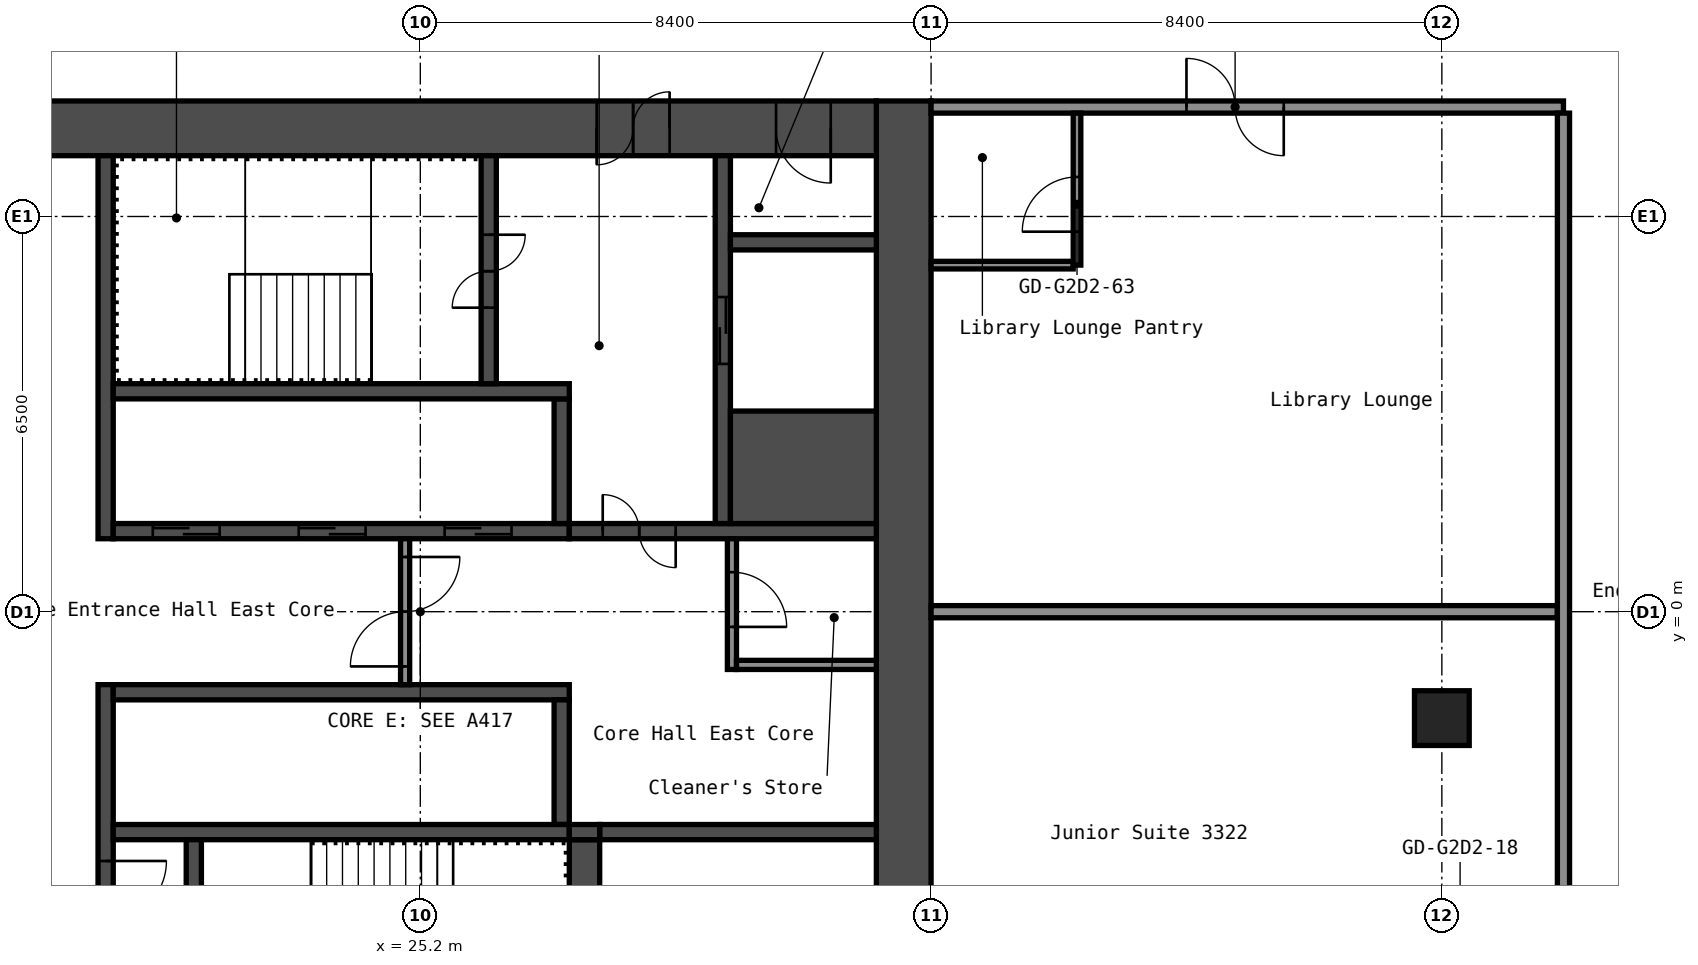
"""IFC4 building model, lengths in metres.
Left out: names, types, materials, properties, quantities, classifications, styles, units other than length and angle.
Written with IfcOpenShell. Run it as: python <this file> out.ifc"""

import sys

from ifc_helpers import new_model, si_unit, direction, frame, frame_2d, origin, origin_2d, place, context, subcontext, project, spatial, rectangle, hollow_rectangle, extrude, element, fill, save


model = new_model("IFC4")
c1 = context("Model", 3, precision=1e-05, world=origin(), true_north=direction((0.0, 1.0)))
c2 = subcontext(c1, "Body", "Model", "MODEL_VIEW")
j1 = project(units=[si_unit("LENGTHUNIT", "METRE"), si_unit("PLANEANGLEUNIT", "RADIAN")], contexts=[c1])
p1 = place(None, origin())
s1 = spatial("IfcSite", under=j1, at=p1, CompositionType="ELEMENT")
p2 = place(p1, origin())
s2 = spatial("IfcBuilding", under=s1, at=p2, CompositionType="ELEMENT")
p3 = place(p2, frame((0.0, 0.0, 117.0)))
s3 = spatial("IfcBuildingStorey", under=s2, at=p3, CompositionType="ELEMENT", Elevation=117.0)
p4 = place(p3, frame((42.0, -1.75, 0.0), z_axis=(0.0, 0.0, 1.0), x_axis=(1.0, 0.0, 0.0)))
e1 = element("IfcColumn", 1, at=p4, inside=s3, PredefinedType="COLUMN", context=c2, shape_type="SweptSolid", body=[
    extrude(hollow_rectangle(XDim=0.9, YDim=0.9, WallThickness=0.036, at=origin_2d()), origin(), (0.0, 0.0, 1.0), 2.9),
])
p5 = place(p3, frame((33.15, -8.4, 0.0), z_axis=(0.0, 0.0, 1.0), x_axis=(0.0, 1.0, 0.0)))
e2 = element("IfcWall", 2, at=p5, inside=s3, PredefinedType="SHEAR", context=c2, shape_type="SweptSolid", body=[
    extrude(rectangle(XDim=16.8, YDim=0.9, at=frame_2d((8.4, 0.0))), origin(), (0.0, 0.0, 1.0), 2.9),
])
p6 = place(p3, frame((17.7, 7.95, 0.0), z_axis=(0.0, 0.0, 1.0), x_axis=(1.0, 0.0, 0.0)))
e3 = element("IfcWall", 3, at=p6, inside=s3, PredefinedType="SHEAR", context=c2, shape_type="SweptSolid", body=[
    extrude(rectangle(XDim=15.0, YDim=0.9, at=frame_2d((7.5, 0.0))), origin(), (0.0, 0.0, 1.0), 2.9),
])
p7 = place(p6, frame((10.4, 0.0, 0.0)))
e4 = element("IfcOpeningElement", 4, at=p7, cuts=e3, PredefinedType="OPENING", context=c2, shape_type="SweptSolid", body=[
    extrude(rectangle(XDim=1.2, YDim=2.1, at=frame_2d((0.6, 1.05))), frame((0.0, 0.46, 0.0), z_axis=(0.0, -1.0, 0.0), x_axis=(1.0, 0.0, 0.0)), (0.0, 0.0, 1.0), 0.92),
])
p8 = place(p6, frame((13.35, 0.0, 0.0)))
e5 = element("IfcOpeningElement", 5, at=p8, cuts=e3, PredefinedType="OPENING", context=c2, shape_type="SweptSolid", body=[
    extrude(rectangle(XDim=0.9, YDim=2.1, at=frame_2d((0.45, 1.05))), frame((0.0, 0.46, 0.0), z_axis=(0.0, -1.0, 0.0), x_axis=(1.0, 0.0, 0.0)), (0.0, 0.0, 1.0), 0.92),
])
p9 = place(p3, frame((20.025, 1.2, 0.0), z_axis=(0.0, 0.0, 1.0), x_axis=(0.0, 1.0, 0.0)))
e6 = element("IfcWall", 6, at=p9, inside=s3, PredefinedType="SHEAR", context=c2, shape_type="SweptSolid", body=[
    extrude(rectangle(XDim=6.3, YDim=0.25, at=frame_2d((3.15, 0.0))), origin(), (0.0, 0.0, 1.0), 2.9),
])
p10 = place(p3, frame((20.025, -7.5, 0.0), z_axis=(0.0, 0.0, 1.0), x_axis=(0.0, 1.0, 0.0)))
e7 = element("IfcWall", 7, at=p10, inside=s3, PredefinedType="SHEAR", context=c2, shape_type="SweptSolid", body=[
    extrude(rectangle(XDim=6.3, YDim=0.25, at=frame_2d((3.15, 0.0))), origin(), (0.0, 0.0, 1.0), 2.9),
])
p11 = place(p10, frame((2.4, 0.0, 0.0)))
e8 = element("IfcOpeningElement", 8, at=p11, cuts=e7, PredefinedType="OPENING", context=c2, shape_type="SweptSolid", body=[
    extrude(rectangle(XDim=1.0, YDim=2.1, at=frame_2d((0.5, 1.05))), frame((0.0, 0.135, 0.0), z_axis=(0.0, -1.0, 0.0), x_axis=(1.0, 0.0, 0.0)), (0.0, 0.0, 1.0), 0.27),
])
p12 = place(p3, frame((20.15, 1.325, 0.0), z_axis=(0.0, 0.0, 1.0), x_axis=(1.0, 0.0, 0.0)))
e9 = element("IfcWall", 9, at=p12, inside=s3, PredefinedType="SHEAR", context=c2, shape_type="SweptSolid", body=[
    extrude(rectangle(XDim=7.5, YDim=0.25, at=frame_2d((3.75, 0.0))), origin(), (0.0, 0.0, 1.0), 2.9),
])
p13 = place(p12, frame((0.65, 0.0, 0.0)))
e10 = element("IfcOpeningElement", 10, at=p13, cuts=e9, PredefinedType="OPENING", context=c2, shape_type="SweptSolid", body=[
    extrude(rectangle(XDim=1.1, YDim=2.1, at=frame_2d((0.55, 1.05))), frame((0.0, 0.135, 0.0), z_axis=(0.0, -1.0, 0.0), x_axis=(1.0, 0.0, 0.0)), (0.0, 0.0, 1.0), 0.27),
])
p14 = place(p12, frame((3.05, 0.0, 0.0)))
e11 = element("IfcOpeningElement", 11, at=p14, cuts=e9, PredefinedType="OPENING", context=c2, shape_type="SweptSolid", body=[
    extrude(rectangle(XDim=1.1, YDim=2.1, at=frame_2d((0.55, 1.05))), frame((0.0, 0.135, 0.0), z_axis=(0.0, -1.0, 0.0), x_axis=(1.0, 0.0, 0.0)), (0.0, 0.0, 1.0), 0.27),
])
p15 = place(p12, frame((5.45, 0.0, 0.0)))
e12 = element("IfcOpeningElement", 12, at=p15, cuts=e9, PredefinedType="OPENING", context=c2, shape_type="SweptSolid", body=[
    extrude(rectangle(XDim=1.1, YDim=2.1, at=frame_2d((0.55, 1.05))), frame((0.0, 0.135, 0.0), z_axis=(0.0, -1.0, 0.0), x_axis=(1.0, 0.0, 0.0)), (0.0, 0.0, 1.0), 0.27),
])
p16 = place(p3, frame((27.525, 1.45, 0.0), z_axis=(0.0, 0.0, 1.0), x_axis=(0.0, 1.0, 0.0)))
e13 = element("IfcWall", 13, at=p16, inside=s3, PredefinedType="SHEAR", context=c2, shape_type="SweptSolid", body=[
    extrude(rectangle(XDim=2.05, YDim=0.25, at=frame_2d((1.025, 0.0))), origin(), (0.0, 0.0, 1.0), 2.9),
])
p17 = place(p3, frame((20.15, 3.625, 0.0), z_axis=(0.0, 0.0, 1.0), x_axis=(1.0, 0.0, 0.0)))
e14 = element("IfcWall", 14, at=p17, inside=s3, PredefinedType="SHEAR", context=c2, shape_type="SweptSolid", body=[
    extrude(rectangle(XDim=7.5, YDim=0.25, at=frame_2d((3.75, 0.0))), origin(), (0.0, 0.0, 1.0), 2.9),
])
p18 = place(p3, frame((26.325, 3.75, 0.0), z_axis=(0.0, 0.0, 1.0), x_axis=(0.0, 1.0, 0.0)))
e15 = element("IfcWall", 15, at=p18, inside=s3, PredefinedType="SHEAR", context=c2, shape_type="SweptSolid", body=[
    extrude(rectangle(XDim=3.75, YDim=0.25, at=frame_2d((1.875, 0.0))), origin(), (0.0, 0.0, 1.0), 2.9),
])
p19 = place(p18, frame((1.25, 0.0, 0.0)))
e16 = element("IfcOpeningElement", 16, at=p19, cuts=e15, PredefinedType="OPENING", context=c2, shape_type="SweptSolid", body=[
    extrude(rectangle(XDim=1.2, YDim=2.1, at=frame_2d((0.6, 1.05))), frame((0.0, 0.135, 0.0), z_axis=(0.0, -1.0, 0.0), x_axis=(1.0, 0.0, 0.0)), (0.0, 0.0, 1.0), 0.27),
])
p20 = place(p3, frame((27.65, 1.325, 0.0), z_axis=(0.0, 0.0, 1.0), x_axis=(1.0, 0.0, 0.0)))
e17 = element("IfcWall", 17, at=p20, inside=s3, PredefinedType="SHEAR", context=c2, shape_type="SweptSolid", body=[
    extrude(rectangle(XDim=5.05, YDim=0.25, at=frame_2d((2.525, 0.0))), origin(), (0.0, 0.0, 1.0), 2.9),
])
p21 = place(p20, frame((0.55, 0.0, 0.0)))
e18 = element("IfcOpeningElement", 18, at=p21, cuts=e17, PredefinedType="OPENING", context=c2, shape_type="SweptSolid", body=[
    extrude(rectangle(XDim=1.2, YDim=2.1, at=frame_2d((0.6, 1.05))), frame((0.0, 0.135, 0.0), z_axis=(0.0, -1.0, 0.0), x_axis=(1.0, 0.0, 0.0)), (0.0, 0.0, 1.0), 0.27),
])
p22 = place(p3, frame((30.175, 1.45, 0.0), z_axis=(0.0, 0.0, 1.0), x_axis=(0.0, 1.0, 0.0)))
e19 = element("IfcWall", 19, at=p22, inside=s3, PredefinedType="SHEAR", context=c2, shape_type="SweptSolid", body=[
    extrude(rectangle(XDim=6.05, YDim=0.25, at=frame_2d((3.025, 0.0))), origin(), (0.0, 0.0, 1.0), 2.9),
])
p23 = place(p22, frame((2.625, 0.0, 0.0)))
e20 = element("IfcOpeningElement", 20, at=p23, cuts=e19, PredefinedType="OPENING", context=c2, shape_type="SweptSolid", body=[
    extrude(rectangle(XDim=1.1, YDim=2.1, at=frame_2d((0.55, 1.05))), frame((0.0, 0.135, 0.0), z_axis=(0.0, -1.0, 0.0), x_axis=(1.0, 0.0, 0.0)), (0.0, 0.0, 1.0), 0.27),
])
p24 = place(p3, frame((30.3, 2.375, 0.0), z_axis=(0.0, 0.0, 1.0), x_axis=(1.0, 0.0, 0.0)))
e21 = element("IfcWall", 21, at=p24, inside=s3, PredefinedType="SHEAR", context=c2, shape_type="SweptSolid", body=[
    extrude(rectangle(XDim=2.4, YDim=1.85, at=frame_2d((1.2, 0.0))), origin(), (0.0, 0.0, 1.0), 2.9),
])
p25 = place(p3, frame((30.3, 6.075, 0.0), z_axis=(0.0, 0.0, 1.0), x_axis=(1.0, 0.0, 0.0)))
e22 = element("IfcWall", 22, at=p25, inside=s3, PredefinedType="SHEAR", context=c2, shape_type="SweptSolid", body=[
    extrude(rectangle(XDim=2.4, YDim=0.25, at=frame_2d((1.2, 0.0))), origin(), (0.0, 0.0, 1.0), 2.9),
])
p26 = place(p3, frame((20.15, -1.325, 0.0), z_axis=(0.0, 0.0, 1.0), x_axis=(1.0, 0.0, 0.0)))
e23 = element("IfcWall", 23, at=p26, inside=s3, PredefinedType="SHEAR", context=c2, shape_type="SweptSolid", body=[
    extrude(rectangle(XDim=7.5, YDim=0.25, at=frame_2d((3.75, 0.0))), origin(), (0.0, 0.0, 1.0), 2.9),
])
p27 = place(p3, frame((27.525, -3.5, 0.0), z_axis=(0.0, 0.0, 1.0), x_axis=(0.0, 1.0, 0.0)))
e24 = element("IfcWall", 24, at=p27, inside=s3, PredefinedType="SHEAR", context=c2, shape_type="SweptSolid", body=[
    extrude(rectangle(XDim=2.05, YDim=0.25, at=frame_2d((1.025, 0.0))), origin(), (0.0, 0.0, 1.0), 2.9),
])
p28 = place(p3, frame((20.15, -3.625, 0.0), z_axis=(0.0, 0.0, 1.0), x_axis=(1.0, 0.0, 0.0)))
e25 = element("IfcWall", 25, at=p28, inside=s3, PredefinedType="SHEAR", context=c2, shape_type="SweptSolid", body=[
    extrude(rectangle(XDim=7.5, YDim=0.25, at=frame_2d((3.75, 0.0))), origin(), (0.0, 0.0, 1.0), 2.9),
])
p29 = place(p3, frame((21.475, -7.5, 0.0), z_axis=(0.0, 0.0, 1.0), x_axis=(0.0, 1.0, 0.0)))
e26 = element("IfcWall", 26, at=p29, inside=s3, PredefinedType="SHEAR", context=c2, shape_type="SweptSolid", body=[
    extrude(rectangle(XDim=3.75, YDim=0.25, at=frame_2d((1.875, 0.0))), origin(), (0.0, 0.0, 1.0), 2.9),
])
p30 = place(p29, frame((1.3, 0.0, 0.0)))
e27 = element("IfcOpeningElement", 27, at=p30, cuts=e26, PredefinedType="OPENING", context=c2, shape_type="SweptSolid", body=[
    extrude(rectangle(XDim=1.2, YDim=2.1, at=frame_2d((0.6, 1.05))), frame((0.0, 0.135, 0.0), z_axis=(0.0, -1.0, 0.0), x_axis=(1.0, 0.0, 0.0)), (0.0, 0.0, 1.0), 0.27),
])
p31 = place(p3, frame((27.9, -7.5, 0.0), z_axis=(0.0, 0.0, 1.0), x_axis=(0.0, 1.0, 0.0)))
e28 = element("IfcWall", 28, at=p31, inside=s3, PredefinedType="SHEAR", context=c2, shape_type="SweptSolid", body=[
    extrude(rectangle(XDim=3.75, YDim=0.5, at=frame_2d((1.875, 0.0))), origin(), (0.0, 0.0, 1.0), 2.9),
])
p32 = place(p3, frame((28.15, -3.625, 0.0), z_axis=(0.0, 0.0, 1.0), x_axis=(1.0, 0.0, 0.0)))
e29 = element("IfcWall", 29, at=p32, inside=s3, PredefinedType="SHEAR", context=c2, shape_type="SweptSolid", body=[
    extrude(rectangle(XDim=4.55, YDim=0.25, at=frame_2d((2.275, 0.0))), origin(), (0.0, 0.0, 1.0), 2.9),
])
p33 = place(p3, frame((27.65, -3.625, 0.0), z_axis=(0.0, 0.0, 1.0), x_axis=(1.0, 0.0, 0.0)))
e30 = element("IfcWall", 30, at=p33, inside=s3, PredefinedType="SHEAR", context=c2, shape_type="SweptSolid", body=[
    extrude(rectangle(XDim=0.5, YDim=0.25, at=frame_2d((0.25, 0.0))), origin(), (0.0, 0.0, 1.0), 2.9),
])
p34 = place(p3, frame((24.95, -1.2, 0.0), z_axis=(0.0, 0.0, 1.0), x_axis=(0.0, 1.0, 0.0)))
e31 = element("IfcWall", 31, at=p34, inside=s3, PredefinedType="PARTITIONING", context=c2, shape_type="SweptSolid", body=[
    extrude(rectangle(XDim=2.4, YDim=0.15, at=frame_2d((1.2, 0.0))), origin(), (0.0, 0.0, 1.0), 2.9),
])
p35 = place(p34, frame((0.3, 0.0, 0.0)))
e32 = element("IfcOpeningElement", 32, at=p35, cuts=e31, PredefinedType="OPENING", context=c2, shape_type="SweptSolid", body=[
    extrude(rectangle(XDim=1.8, YDim=2.1, at=frame_2d((0.9, 1.05))), frame((0.0, 0.085, 0.0), z_axis=(0.0, -1.0, 0.0), x_axis=(1.0, 0.0, 0.0)), (0.0, 0.0, 1.0), 0.17),
])
p36 = place(p3, frame((30.325, -0.95, 0.0), z_axis=(0.0, 0.0, 1.0), x_axis=(0.0, 1.0, 0.0)))
e33 = element("IfcWall", 33, at=p36, inside=s3, PredefinedType="PARTITIONING", context=c2, shape_type="SweptSolid", body=[
    extrude(rectangle(XDim=2.15, YDim=0.15, at=frame_2d((1.075, 0.0))), origin(), (0.0, 0.0, 1.0), 2.9),
])
p37 = place(p36, frame((0.7, 0.0, 0.0)))
e34 = element("IfcOpeningElement", 34, at=p37, cuts=e33, PredefinedType="OPENING", context=c2, shape_type="SweptSolid", body=[
    extrude(rectangle(XDim=0.9, YDim=2.1, at=frame_2d((0.45, 1.05))), frame((0.0, 0.085, 0.0), z_axis=(0.0, -1.0, 0.0), x_axis=(1.0, 0.0, 0.0)), (0.0, 0.0, 1.0), 0.17),
])
p38 = place(p3, frame((30.4, -0.875, 0.0), z_axis=(0.0, 0.0, 1.0), x_axis=(1.0, 0.0, 0.0)))
e35 = element("IfcWall", 35, at=p38, inside=s3, PredefinedType="PARTITIONING", context=c2, shape_type="SweptSolid", body=[
    extrude(rectangle(XDim=2.3, YDim=0.15, at=frame_2d((1.15, 0.0))), origin(), (0.0, 0.0, 1.0), 2.9),
])
p39 = place(p3, frame((33.6, 0.0, 0.0), z_axis=(0.0, 0.0, 1.0), x_axis=(1.0, 0.0, 0.0)))
e36 = element("IfcWall", 36, at=p39, inside=s3, PredefinedType="PARTITIONING", context=c2, shape_type="SweptSolid", body=[
    extrude(rectangle(XDim=10.3, YDim=0.2, at=frame_2d((5.15, 0.0))), origin(), (0.0, 0.0, 1.0), 2.9),
])
p40 = place(p3, frame((33.6, 5.7, 0.0), z_axis=(0.0, 0.0, 1.0), x_axis=(1.0, 0.0, 0.0)))
e37 = element("IfcWall", 37, at=p40, inside=s3, PredefinedType="PARTITIONING", context=c2, shape_type="SweptSolid", body=[
    extrude(rectangle(XDim=2.337, YDim=0.125, at=frame_2d((1.169, 0.0))), origin(), (0.0, 0.0, 1.0), 2.9),
])
p41 = place(p3, frame((33.6, 8.3, 0.0), z_axis=(0.0, 0.0, 1.0), x_axis=(1.0, 0.0, 0.0)))
e38 = element("IfcWall", 38, at=p41, inside=s3, PredefinedType="PARTITIONING", context=c2, shape_type="SweptSolid", body=[
    extrude(rectangle(XDim=10.4, YDim=0.2, at=frame_2d((5.2, 0.0))), origin(), (0.0, 0.0, 1.0), 2.9),
])
p42 = place(p41, frame((4.2, 0.0, 0.0)))
e39 = element("IfcOpeningElement", 39, at=p42, cuts=e38, PredefinedType="OPENING", context=c2, shape_type="SweptSolid", body=[
    extrude(rectangle(XDim=1.6, YDim=2.1, at=frame_2d((0.8, 1.05))), frame((0.0, 0.11, 0.0), z_axis=(0.0, -1.0, 0.0), x_axis=(1.0, 0.0, 0.0)), (0.0, 0.0, 1.0), 0.22),
])
p43 = place(p3, frame((36.0, 5.7, 0.0), z_axis=(0.0, 0.0, 1.0), x_axis=(0.0, 1.0, 0.0)))
e40 = element("IfcWall", 40, at=p43, inside=s3, PredefinedType="PARTITIONING", context=c2, shape_type="SweptSolid", body=[
    extrude(rectangle(XDim=2.5, YDim=0.125, at=frame_2d((1.25, 0.0))), origin(), (0.0, 0.0, 1.0), 2.9),
])
p44 = place(p43, frame((0.55, 0.0, 0.0)))
e41 = element("IfcOpeningElement", 41, at=p44, cuts=e40, PredefinedType="OPENING", context=c2, shape_type="SweptSolid", body=[
    extrude(rectangle(XDim=0.9, YDim=2.1, at=frame_2d((0.45, 1.05))), frame((0.0, 0.073, 0.0), z_axis=(0.0, -1.0, 0.0), x_axis=(1.0, 0.0, 0.0)), (0.0, 0.0, 1.0), 0.145),
])
p45 = place(p3, frame((44.0, -8.2, 0.0), z_axis=(0.0, 0.0, 1.0), x_axis=(0.0, 1.0, 0.0)))
e42 = element("IfcWall", 42, at=p45, inside=s3, PredefinedType="PARTITIONING", context=c2, shape_type="SweptSolid", body=[
    extrude(rectangle(XDim=16.4, YDim=0.2, at=frame_2d((8.2, 0.0))), origin(), (0.0, 0.0, 1.0), 2.9),
])
p46 = place(p7, origin())
e43 = element("IfcDoor", 43, at=p46, inside=s3, OperationType="DOUBLE_DOOR_SINGLE_SWING", PredefinedType="DOOR", context=c2, shape_type="SweptSolid", body=[
    extrude(rectangle(XDim=1.2, YDim=2.1, at=frame_2d((0.6, 1.05))), frame((0.0, 0.025, 0.0), z_axis=(0.0, -1.0, 0.0), x_axis=(1.0, 0.0, 0.0)), (0.0, 0.0, 1.0), 0.05),
])
fill(e4, e43)
p47 = place(p8, origin())
e44 = element("IfcDoor", 44, at=p47, inside=s3, OperationType="SINGLE_SWING_RIGHT", PredefinedType="DOOR", context=c2, shape_type="SweptSolid", body=[
    extrude(rectangle(XDim=0.9, YDim=2.1, at=frame_2d((0.45, 1.05))), frame((0.0, 0.025, 0.0), z_axis=(0.0, -1.0, 0.0), x_axis=(1.0, 0.0, 0.0)), (0.0, 0.0, 1.0), 0.05),
])
fill(e5, e44)
p48 = place(p19, origin())
e45 = element("IfcDoor", 45, at=p48, inside=s3, OperationType="DOUBLE_DOOR_SINGLE_SWING", PredefinedType="DOOR", context=c2, shape_type="SweptSolid", body=[
    extrude(rectangle(XDim=1.2, YDim=2.1, at=frame_2d((0.6, 1.05))), frame((0.0, 0.025, 0.0), z_axis=(0.0, -1.0, 0.0), x_axis=(1.0, 0.0, 0.0)), (0.0, 0.0, 1.0), 0.05),
])
fill(e16, e45)
p49 = place(p11, origin())
e46 = element("IfcDoor", 46, at=p49, inside=s3, OperationType="SINGLE_SWING_RIGHT", PredefinedType="DOOR", context=c2, shape_type="SweptSolid", body=[
    extrude(rectangle(XDim=1.0, YDim=2.1, at=frame_2d((0.5, 1.05))), frame((0.0, 0.025, 0.0), z_axis=(0.0, -1.0, 0.0), x_axis=(1.0, 0.0, 0.0)), (0.0, 0.0, 1.0), 0.05),
])
fill(e8, e46)
p50 = place(p21, origin())
e47 = element("IfcDoor", 47, at=p50, inside=s3, OperationType="DOUBLE_DOOR_SINGLE_SWING", PredefinedType="DOOR", context=c2, shape_type="SweptSolid", body=[
    extrude(rectangle(XDim=1.2, YDim=2.1, at=frame_2d((0.6, 1.05))), frame((0.0, 0.025, 0.0), z_axis=(0.0, -1.0, 0.0), x_axis=(1.0, 0.0, 0.0)), (0.0, 0.0, 1.0), 0.05),
])
fill(e18, e47)
p51 = place(p35, origin())
e48 = element("IfcDoor", 48, at=p51, inside=s3, OperationType="DOUBLE_DOOR_SINGLE_SWING", PredefinedType="DOOR", context=c2, shape_type="SweptSolid", body=[
    extrude(rectangle(XDim=1.8, YDim=2.1, at=frame_2d((0.9, 1.05))), frame((0.0, 0.025, 0.0), z_axis=(0.0, -1.0, 0.0), x_axis=(1.0, 0.0, 0.0)), (0.0, 0.0, 1.0), 0.05),
])
fill(e32, e48)
p52 = place(p37, origin())
e49 = element("IfcDoor", 49, at=p52, inside=s3, OperationType="SINGLE_SWING_LEFT", PredefinedType="DOOR", context=c2, shape_type="SweptSolid", body=[
    extrude(rectangle(XDim=0.9, YDim=2.1, at=frame_2d((0.45, 1.05))), frame((0.0, 0.025, 0.0), z_axis=(0.0, -1.0, 0.0), x_axis=(1.0, 0.0, 0.0)), (0.0, 0.0, 1.0), 0.05),
])
fill(e34, e49)
p53 = place(p13, origin())
e50 = element("IfcDoor", 50, at=p53, inside=s3, OperationType="DOUBLE_DOOR_SLIDING", PredefinedType="DOOR", context=c2, shape_type="SweptSolid", body=[
    extrude(rectangle(XDim=1.1, YDim=2.1, at=frame_2d((0.55, 1.05))), frame((0.0, 0.025, 0.0), z_axis=(0.0, -1.0, 0.0), x_axis=(1.0, 0.0, 0.0)), (0.0, 0.0, 1.0), 0.05),
])
fill(e10, e50)
p54 = place(p14, origin())
e51 = element("IfcDoor", 51, at=p54, inside=s3, OperationType="DOUBLE_DOOR_SLIDING", PredefinedType="DOOR", context=c2, shape_type="SweptSolid", body=[
    extrude(rectangle(XDim=1.1, YDim=2.1, at=frame_2d((0.55, 1.05))), frame((0.0, 0.025, 0.0), z_axis=(0.0, -1.0, 0.0), x_axis=(1.0, 0.0, 0.0)), (0.0, 0.0, 1.0), 0.05),
])
fill(e11, e51)
p55 = place(p15, origin())
e52 = element("IfcDoor", 52, at=p55, inside=s3, OperationType="DOUBLE_DOOR_SLIDING", PredefinedType="DOOR", context=c2, shape_type="SweptSolid", body=[
    extrude(rectangle(XDim=1.1, YDim=2.1, at=frame_2d((0.55, 1.05))), frame((0.0, 0.025, 0.0), z_axis=(0.0, -1.0, 0.0), x_axis=(1.0, 0.0, 0.0)), (0.0, 0.0, 1.0), 0.05),
])
fill(e12, e52)
p56 = place(p23, origin())
e53 = element("IfcDoor", 53, at=p56, inside=s3, OperationType="DOUBLE_DOOR_SLIDING", PredefinedType="DOOR", context=c2, shape_type="SweptSolid", body=[
    extrude(rectangle(XDim=1.1, YDim=2.1, at=frame_2d((0.55, 1.05))), frame((0.0, 0.025, 0.0), z_axis=(0.0, -1.0, 0.0), x_axis=(1.0, 0.0, 0.0)), (0.0, 0.0, 1.0), 0.05),
])
fill(e20, e53)
p57 = place(p42, origin())
e54 = element("IfcDoor", 54, at=p57, inside=s3, OperationType="DOUBLE_DOOR_SINGLE_SWING", PredefinedType="DOOR", context=c2, shape_type="SweptSolid", body=[
    extrude(rectangle(XDim=1.6, YDim=2.1, at=frame_2d((0.8, 1.05))), frame((0.0, 0.025, 0.0), z_axis=(0.0, -1.0, 0.0), x_axis=(1.0, 0.0, 0.0)), (0.0, 0.0, 1.0), 0.05),
])
fill(e39, e54)
p58 = place(p44, origin())
e55 = element("IfcDoor", 55, at=p58, inside=s3, OperationType="SINGLE_SWING_RIGHT", PredefinedType="DOOR", context=c2, shape_type="SweptSolid", body=[
    extrude(rectangle(XDim=0.9, YDim=2.1, at=frame_2d((0.45, 1.05))), frame((0.0, 0.025, 0.0), z_axis=(0.0, -1.0, 0.0), x_axis=(1.0, 0.0, 0.0)), (0.0, 0.0, 1.0), 0.05),
])
fill(e41, e55)
save(model, sys.argv[1])
